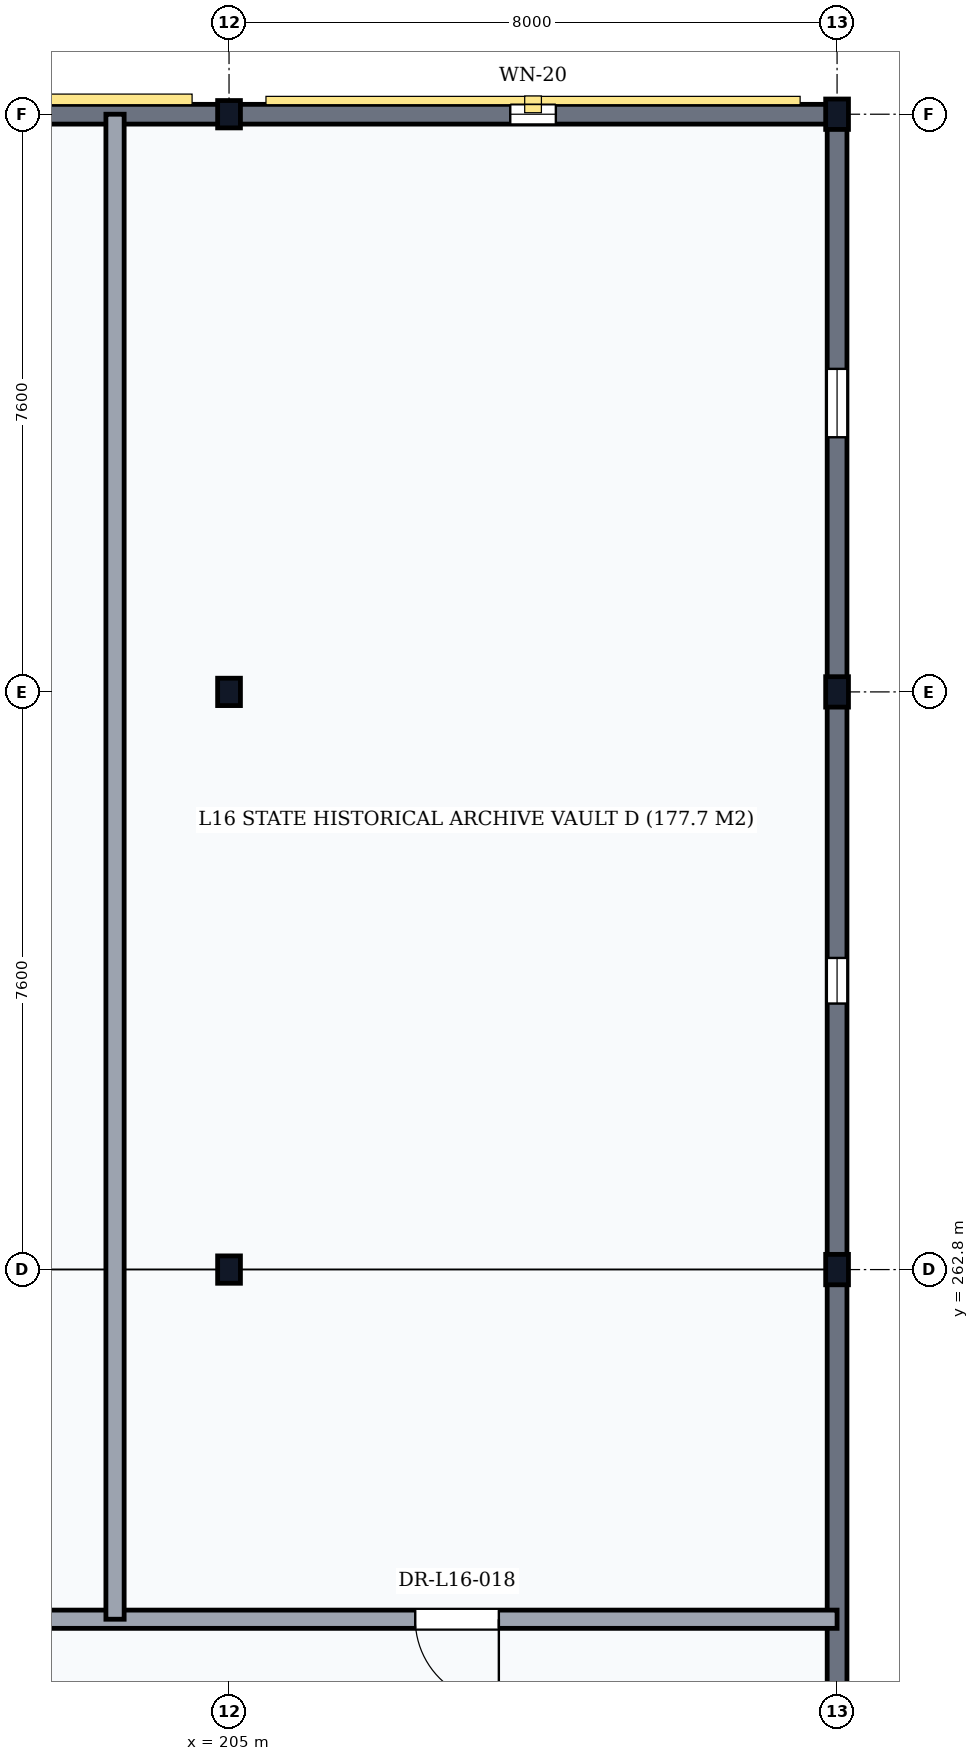
"""IFC4 building model, lengths in metres.
Left out: names, types, materials, properties, quantities, classifications, styles, units other than length and angle.
Written with IfcOpenShell. Run it as: python <this file> out.ifc"""

import sys

from ifc_helpers import new_model, si_unit, direction, frame, frame_2d, origin, origin_2d, place, context, subcontext, project, spatial, rectangle, i_section, extrude, element, fill, save


model = new_model("IFC4")
c1 = context("Model", 3, precision=1e-05, world=origin(), true_north=direction((0.0, 1.0)))
c2 = subcontext(c1, "Body", "Model", "MODEL_VIEW")
j1 = project(units=[si_unit("LENGTHUNIT", "METRE"), si_unit("PLANEANGLEUNIT", "RADIAN")], contexts=[c1])
p1 = place(None, origin())
s1 = spatial("IfcSite", under=j1, at=p1, CompositionType="ELEMENT")
p2 = place(p1, origin())
s2 = spatial("IfcBuilding", under=s1, at=p2, CompositionType="ELEMENT")
p3 = place(p2, frame((0.0, 0.0, 63.9)))
s3 = spatial("IfcBuildingStorey", under=s2, at=p3, CompositionType="ELEMENT", Elevation=63.9)
for number, where, z_axis, x_axis in (
    (1, (205.0, 262.8, 0.0), (0.0, 0.0, 1.0), (1.0, 0.0, 0.0)),
    (2, (205.0, 270.4, 0.0), (0.0, 0.0, 1.0), (1.0, 0.0, 0.0)),
    (3, (205.0, 278.0, 0.0), (0.0, 0.0, 1.0), (1.0, 0.0, 0.0)),
):
    element("IfcColumn", number, at=place(p3, frame(where, z_axis=z_axis, x_axis=x_axis)), inside=s3, PredefinedType="COLUMN", context=c2, shape_type="SweptSolid", body=[
        extrude(i_section(OverallWidth=0.3, OverallDepth=0.36, WebThickness=0.012, FlangeThickness=0.022, FilletRadius=0.027, at=origin_2d()), origin(), (0.0, 0.0, 1.0), 3.9),
    ])
for number, where, z_axis, x_axis in (
    (4, (213.0, 262.8, 0.0), (0.0, 0.0, 1.0), (1.0, 0.0, 0.0)),
    (5, (213.0, 270.4, 0.0), (0.0, 0.0, 1.0), (1.0, 0.0, 0.0)),
    (6, (213.0, 278.0, 0.0), (0.0, 0.0, 1.0), (1.0, 0.0, 0.0)),
):
    element("IfcColumn", number, at=place(p3, frame(where, z_axis=z_axis, x_axis=x_axis)), inside=s3, PredefinedType="COLUMN", context=c2, shape_type="SweptSolid", body=[
        extrude(i_section(OverallWidth=0.3, OverallDepth=0.4, WebThickness=0.013, FlangeThickness=0.024, FilletRadius=0.027, at=origin_2d()), origin(), (0.0, 0.0, 1.0), 3.9),
    ])
p4 = place(p3, frame((197.006, 278.0, 0.0), z_axis=(0.0, 0.0, 1.0), x_axis=(1.0, 0.0, 0.0)))
e7 = element("IfcWall", 7, at=p4, inside=s3, PredefinedType="SOLIDWALL", context=c2, shape_type="SweptSolid", body=[
    extrude(rectangle(XDim=7.988, YDim=0.26, at=frame_2d((3.994, 0.0))), origin(), (0.0, 0.0, 1.0), 3.388),
])
p5 = place(p4, frame((3.147, 0.0, 0.95)))
e8 = element("IfcOpeningElement", 8, at=p5, cuts=e7, PredefinedType="OPENING", context=c2, shape_type="SweptSolid", body=[
    extrude(rectangle(XDim=0.65, YDim=1.8, at=frame_2d((0.325, 0.9))), frame((0.0, 0.145, 0.0), z_axis=(0.0, -1.0, 0.0), x_axis=(1.0, 0.0, 0.0)), (0.0, 0.0, 1.0), 0.29),
])
p6 = place(p3, frame((205.006, 278.0, 0.0), z_axis=(0.0, 0.0, 1.0), x_axis=(1.0, 0.0, 0.0)))
e9 = element("IfcWall", 9, at=p6, inside=s3, PredefinedType="SOLIDWALL", context=c2, shape_type="SweptSolid", body=[
    extrude(rectangle(XDim=7.988, YDim=0.26, at=frame_2d((3.994, 0.0))), origin(), (0.0, 0.0, 1.0), 3.388),
])
p7 = place(p6, frame((3.694, 0.0, 0.95)))
e10 = element("IfcOpeningElement", 10, at=p7, cuts=e9, PredefinedType="OPENING", context=c2, shape_type="SweptSolid", body=[
    extrude(rectangle(XDim=0.6, YDim=1.5, at=frame_2d((0.3, 0.75))), frame((0.0, 0.145, 0.0), z_axis=(0.0, -1.0, 0.0), x_axis=(1.0, 0.0, 0.0)), (0.0, 0.0, 1.0), 0.29),
])
p8 = place(p3, frame((213.0, 255.206, 0.0), z_axis=(0.0, 0.0, 1.0), x_axis=(0.0, 1.0, 0.0)))
e11 = element("IfcWall", 11, at=p8, inside=s3, PredefinedType="SOLIDWALL", context=c2, shape_type="SweptSolid", body=[
    extrude(rectangle(XDim=7.588, YDim=0.26, at=frame_2d((3.794, 0.0))), origin(), (0.0, 0.0, 1.0), 3.428),
])
p9 = place(p3, frame((213.0, 262.806, 0.0), z_axis=(0.0, 0.0, 1.0), x_axis=(0.0, 1.0, 0.0)))
e12 = element("IfcWall", 12, at=p9, inside=s3, PredefinedType="SOLIDWALL", context=c2, shape_type="SweptSolid", body=[
    extrude(rectangle(XDim=7.588, YDim=0.26, at=frame_2d((3.794, 0.0))), origin(), (0.0, 0.0, 1.0), 3.428),
])
p10 = place(p9, frame((3.494, 0.0, 0.95)))
e13 = element("IfcOpeningElement", 13, at=p10, cuts=e12, PredefinedType="OPENING", context=c2, shape_type="SweptSolid", body=[
    extrude(rectangle(XDim=0.6, YDim=1.5, at=frame_2d((0.3, 0.75))), frame((0.0, 0.145, 0.0), z_axis=(0.0, -1.0, 0.0), x_axis=(1.0, 0.0, 0.0)), (0.0, 0.0, 1.0), 0.29),
])
p11 = place(p3, frame((213.0, 270.406, 0.0), z_axis=(0.0, 0.0, 1.0), x_axis=(0.0, 1.0, 0.0)))
e14 = element("IfcWall", 14, at=p11, inside=s3, PredefinedType="SOLIDWALL", context=c2, shape_type="SweptSolid", body=[
    extrude(rectangle(XDim=7.588, YDim=0.26, at=frame_2d((3.794, 0.0))), origin(), (0.0, 0.0, 1.0), 3.428),
])
p12 = place(p11, frame((3.344, 0.0, 0.95)))
e15 = element("IfcOpeningElement", 15, at=p12, cuts=e14, PredefinedType="OPENING", context=c2, shape_type="SweptSolid", body=[
    extrude(rectangle(XDim=0.9, YDim=2.2, at=frame_2d((0.45, 1.1))), frame((0.0, 0.145, 0.0), z_axis=(0.0, -1.0, 0.0), x_axis=(1.0, 0.0, 0.0)), (0.0, 0.0, 1.0), 0.29),
])
p13 = place(p3, frame((176.0, 258.2, 0.0), z_axis=(0.0, 0.0, 1.0), x_axis=(1.0, 0.0, 0.0)))
e16 = element("IfcWall", 16, at=p13, inside=s3, PredefinedType="PARTITIONING", context=c2, shape_type="SweptSolid", body=[
    extrude(rectangle(XDim=37.0, YDim=0.24, at=frame_2d((18.5, 0.0))), origin(), (0.0, 0.0, 1.0), 3.7),
])
p14 = place(p13, frame((3.36, 0.0, 0.0)))
e17 = element("IfcOpeningElement", 17, at=p14, cuts=e16, PredefinedType="OPENING", context=c2, shape_type="SweptSolid", body=[
    extrude(rectangle(XDim=1.1, YDim=2.1, at=frame_2d((0.55, 1.05))), frame((0.0, 0.135, 0.0), z_axis=(0.0, -1.0, 0.0), x_axis=(1.0, 0.0, 0.0)), (0.0, 0.0, 1.0), 0.27),
])
p15 = place(p13, frame((13.54, 0.0, 0.0)))
e18 = element("IfcOpeningElement", 18, at=p15, cuts=e16, PredefinedType="OPENING", context=c2, shape_type="SweptSolid", body=[
    extrude(rectangle(XDim=1.1, YDim=2.1, at=frame_2d((0.55, 1.05))), frame((0.0, 0.135, 0.0), z_axis=(0.0, -1.0, 0.0), x_axis=(1.0, 0.0, 0.0)), (0.0, 0.0, 1.0), 0.27),
])
p16 = place(p13, frame((21.95, 0.0, 0.0)))
e19 = element("IfcOpeningElement", 19, at=p16, cuts=e16, PredefinedType="OPENING", context=c2, shape_type="SweptSolid", body=[
    extrude(rectangle(XDim=1.1, YDim=2.1, at=frame_2d((0.55, 1.05))), frame((0.0, 0.135, 0.0), z_axis=(0.0, -1.0, 0.0), x_axis=(1.0, 0.0, 0.0)), (0.0, 0.0, 1.0), 0.27),
])
p17 = place(p13, frame((31.45, 0.0, 0.0)))
e20 = element("IfcOpeningElement", 20, at=p17, cuts=e16, PredefinedType="OPENING", context=c2, shape_type="SweptSolid", body=[
    extrude(rectangle(XDim=1.1, YDim=2.1, at=frame_2d((0.55, 1.05))), frame((0.0, 0.135, 0.0), z_axis=(0.0, -1.0, 0.0), x_axis=(1.0, 0.0, 0.0)), (0.0, 0.0, 1.0), 0.27),
])
p18 = place(p3, frame((203.5, 258.2, 0.0), z_axis=(0.0, 0.0, 1.0), x_axis=(0.0, 1.0, 0.0)))
e21 = element("IfcWall", 21, at=p18, inside=s3, PredefinedType="PARTITIONING", context=c2, shape_type="SweptSolid", body=[
    extrude(rectangle(XDim=19.8, YDim=0.24, at=frame_2d((9.9, 0.0))), origin(), (0.0, 0.0, 1.0), 3.7),
])
p19 = place(p7, origin())
e22 = element("IfcWindow", 22, at=p19, inside=s3, PartitioningType="SINGLE_PANEL", PredefinedType="WINDOW", context=c2, shape_type="SweptSolid", body=[
    extrude(rectangle(XDim=0.6, YDim=1.5, at=frame_2d((0.3, 0.75))), frame((0.0, 0.03, 0.0), z_axis=(0.0, -1.0, 0.0), x_axis=(1.0, 0.0, 0.0)), (0.0, 0.0, 1.0), 0.06),
])
fill(e10, e22)
p20 = place(p10, origin())
e23 = element("IfcWindow", 23, at=p20, inside=s3, PartitioningType="SINGLE_PANEL", PredefinedType="WINDOW", context=c2, shape_type="SweptSolid", body=[
    extrude(rectangle(XDim=0.6, YDim=1.5, at=frame_2d((0.3, 0.75))), frame((0.0, 0.03, 0.0), z_axis=(0.0, -1.0, 0.0), x_axis=(1.0, 0.0, 0.0)), (0.0, 0.0, 1.0), 0.06),
])
fill(e13, e23)
p21 = place(p12, origin())
e24 = element("IfcWindow", 24, at=p21, inside=s3, PartitioningType="SINGLE_PANEL", PredefinedType="WINDOW", context=c2, shape_type="SweptSolid", body=[
    extrude(rectangle(XDim=0.9, YDim=2.2, at=frame_2d((0.45, 1.1))), frame((0.0, 0.03, 0.0), z_axis=(0.0, -1.0, 0.0), x_axis=(1.0, 0.0, 0.0)), (0.0, 0.0, 1.0), 0.06),
])
fill(e15, e24)
p22 = place(p17, origin())
e25 = element("IfcDoor", 25, at=p22, inside=s3, OperationType="SINGLE_SWING_RIGHT", PredefinedType="DOOR", context=c2, shape_type="SweptSolid", body=[
    extrude(rectangle(XDim=1.1, YDim=2.1, at=frame_2d((0.55, 1.05))), frame((0.0, 0.025, 0.0), z_axis=(0.0, -1.0, 0.0), x_axis=(1.0, 0.0, 0.0)), (0.0, 0.0, 1.0), 0.05),
])
fill(e20, e25)
save(model, sys.argv[1])
